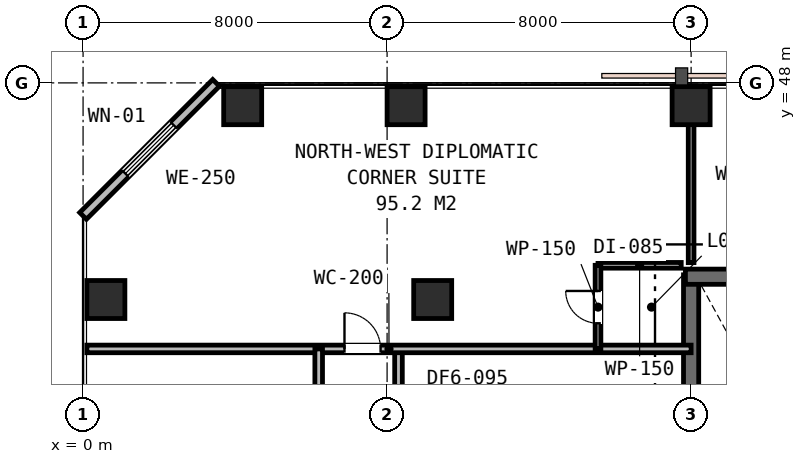
"""IFC4 building model, lengths in metres.
Left out: names, types, materials, properties, quantities, classifications, styles, units other than length and angle.
Written with IfcOpenShell. Run it as: python <this file> out.ifc"""

import sys

from ifc_helpers import new_model, si_unit, direction, frame, frame_2d, origin, origin_2d, place, context, subcontext, project, spatial, rectangle, extrude, element, fill, save


model = new_model("IFC4")
c1 = context("Model", 3, precision=1e-05, world=origin(), true_north=direction((0.0, 1.0)))
c2 = subcontext(c1, "Body", "Model", "MODEL_VIEW")
j1 = project(units=[si_unit("LENGTHUNIT", "METRE"), si_unit("PLANEANGLEUNIT", "RADIAN")], contexts=[c1])
p1 = place(None, origin())
s1 = spatial("IfcSite", under=j1, at=p1, CompositionType="ELEMENT")
p2 = place(p1, origin())
s2 = spatial("IfcBuilding", under=s1, at=p2, CompositionType="ELEMENT")
p3 = place(p2, frame((0.0, 0.0, 25.8)))
s3 = spatial("IfcBuildingStorey", under=s2, at=p3, CompositionType="ELEMENT", Elevation=25.8)
p4 = place(p3, frame((16.0, 30.65, 0.0), z_axis=(0.0, 0.0, 1.0), x_axis=(0.0, 1.0, 0.0)))
e1 = element("IfcWall", 1, at=p4, inside=s3, PredefinedType="SHEAR", context=c2, shape_type="SweptSolid", body=[
    extrude(rectangle(XDim=12.3, YDim=0.4, at=frame_2d((6.15, 0.0))), origin(), (0.0, 0.0, 1.0), 3.6),
])
p5 = place(p3, frame((15.85, 42.9, 0.0), z_axis=(0.0, 0.0, 1.0), x_axis=(1.0, 0.0, 0.0)))
e2 = element("IfcWall", 2, at=p5, inside=s3, PredefinedType="SHEAR", context=c2, shape_type="SweptSolid", body=[
    extrude(rectangle(XDim=24.3, YDim=0.4, at=frame_2d((12.15, 0.0))), origin(), (0.0, 0.0, 1.0), 3.6),
])
for number, where, z_axis, x_axis in (
    (3, (9.2, 42.3, 0.0), (0.0, 0.0, 1.0), (1.0, 0.0, 0.0)),
    (4, (0.6, 42.3, 0.0), (0.0, 0.0, 1.0), (1.0, 0.0, 0.0)),
    (5, (4.2, 47.4, 0.0), (0.0, 0.0, 1.0), (1.0, 0.0, 0.0)),
    (6, (8.5, 47.4, 0.0), (0.0, 0.0, 1.0), (1.0, 0.0, 0.0)),
    (7, (16.0, 47.4, 0.0), (0.0, 0.0, 1.0), (1.0, 0.0, 0.0)),
):
    element("IfcColumn", number, at=place(p3, frame(where, z_axis=z_axis, x_axis=x_axis)), inside=s3, PredefinedType="COLUMN", context=c2, shape_type="SweptSolid", body=[
        extrude(rectangle(XDim=1.0, YDim=1.0, at=origin_2d()), origin(), (0.0, 0.0, 1.0), 3.6),
    ])
p6 = place(p3, frame((3.5, 48.0, 0.0), z_axis=(0.0, 0.0, 1.0), x_axis=(-0.707106781187, -0.707106781187, 0.0)))
e8 = element("IfcWall", 8, at=p6, inside=s3, PredefinedType="STANDARD", context=c2, shape_type="SweptSolid", body=[
    extrude(rectangle(XDim=4.95, YDim=0.25, at=frame_2d((2.475, 0.0))), origin(), (0.0, 0.0, 1.0), 3.33),
])
p7 = place(p6, frame((1.575, 0.0, 0.75)))
e9 = element("IfcOpeningElement", 9, at=p7, cuts=e8, PredefinedType="OPENING", context=c2, shape_type="SweptSolid", body=[
    extrude(rectangle(XDim=1.8, YDim=1.85, at=frame_2d((0.9, 0.925))), frame((0.0, 0.135, 0.0), z_axis=(0.0, -1.0, 0.0), x_axis=(1.0, 0.0, 0.0)), (0.0, 0.0, 1.0), 0.27),
])
p8 = place(p3, frame((8.3, 30.8, 0.0), z_axis=(0.0, 0.0, 1.0), x_axis=(0.0, 1.0, 0.0)))
e10 = element("IfcWall", 10, at=p8, inside=s3, PredefinedType="PARTITIONING", context=c2, shape_type="SweptSolid", body=[
    extrude(rectangle(XDim=10.2, YDim=0.2, at=frame_2d((5.1, 0.0))), origin(), (0.0, 0.0, 1.0), 2.68),
])
p9 = place(p8, frame((1.95, 0.0, 0.0)))
e11 = element("IfcOpeningElement", 11, at=p9, cuts=e10, PredefinedType="OPENING", context=c2, shape_type="SweptSolid", body=[
    extrude(rectangle(XDim=0.9, YDim=2.15, at=frame_2d((0.45, 1.075))), frame((0.0, 0.11, 0.0), z_axis=(0.0, -1.0, 0.0), x_axis=(1.0, 0.0, 0.0)), (0.0, 0.0, 1.0), 0.22),
])
p10 = place(p8, frame((7.025, 0.0, 0.0)))
e12 = element("IfcOpeningElement", 12, at=p10, cuts=e10, PredefinedType="OPENING", context=c2, shape_type="SweptSolid", body=[
    extrude(rectangle(XDim=0.95, YDim=2.15, at=frame_2d((0.475, 1.075))), frame((0.0, 0.11, 0.0), z_axis=(0.0, -1.0, 0.0), x_axis=(1.0, 0.0, 0.0)), (0.0, 0.0, 1.0), 0.22),
])
p11 = place(p3, frame((0.1, 41.0, 0.0), z_axis=(0.0, 0.0, 1.0), x_axis=(1.0, 0.0, 0.0)))
e13 = element("IfcWall", 13, at=p11, inside=s3, PredefinedType="PARTITIONING", context=c2, shape_type="SweptSolid", body=[
    extrude(rectangle(XDim=15.9, YDim=0.2, at=frame_2d((7.95, 0.0))), origin(), (0.0, 0.0, 1.0), 2.68),
])
p12 = place(p11, frame((6.779, 0.0, 0.0)))
e14 = element("IfcOpeningElement", 14, at=p12, cuts=e13, PredefinedType="OPENING", context=c2, shape_type="SweptSolid", body=[
    extrude(rectangle(XDim=0.95, YDim=2.15, at=frame_2d((0.475, 1.075))), frame((0.0, 0.11, 0.0), z_axis=(0.0, -1.0, 0.0), x_axis=(1.0, 0.0, 0.0)), (0.0, 0.0, 1.0), 0.22),
])
p13 = place(p3, frame((13.55, 43.2, 0.0), z_axis=(0.0, 0.0, 1.0), x_axis=(1.0, 0.0, 0.0)))
e15 = element("IfcWall", 15, at=p13, inside=s3, PredefinedType="PARTITIONING", context=c2, shape_type="SweptSolid", body=[
    extrude(rectangle(XDim=2.19, YDim=0.15, at=frame_2d((1.095, 0.0))), origin(), (0.0, 0.0, 1.0), 3.33),
])
p14 = place(p3, frame((13.55, 41.0, 0.0), z_axis=(0.0, 0.0, 1.0), x_axis=(0.0, 1.0, 0.0)))
e16 = element("IfcWall", 16, at=p14, inside=s3, PredefinedType="PARTITIONING", context=c2, shape_type="SweptSolid", body=[
    extrude(rectangle(XDim=2.2, YDim=0.15, at=frame_2d((1.1, 0.0))), origin(), (0.0, 0.0, 1.0), 3.33),
])
p15 = place(p14, frame((0.675, 0.0, 0.0)))
e17 = element("IfcOpeningElement", 17, at=p15, cuts=e16, PredefinedType="OPENING", context=c2, shape_type="SweptSolid", body=[
    extrude(rectangle(XDim=0.85, YDim=2.15, at=frame_2d((0.425, 1.075))), frame((0.0, 0.085, 0.0), z_axis=(0.0, -1.0, 0.0), x_axis=(1.0, 0.0, 0.0)), (0.0, 0.0, 1.0), 0.17),
])
p16 = place(p3, frame((6.2, 28.6, 0.0), z_axis=(0.0, 0.0, 1.0), x_axis=(0.0, 1.0, 0.0)))
e18 = element("IfcWall", 18, at=p16, inside=s3, PredefinedType="PARTITIONING", context=c2, shape_type="SweptSolid", body=[
    extrude(rectangle(XDim=12.4, YDim=0.2, at=frame_2d((6.2, 0.0))), origin(), (0.0, 0.0, 1.0), 2.68),
])
p17 = place(p16, frame((3.725, 0.0, 0.0)))
e19 = element("IfcOpeningElement", 19, at=p17, cuts=e18, PredefinedType="OPENING", context=c2, shape_type="SweptSolid", body=[
    extrude(rectangle(XDim=0.95, YDim=2.15, at=frame_2d((0.475, 1.075))), frame((0.0, 0.11, 0.0), z_axis=(0.0, -1.0, 0.0), x_axis=(1.0, 0.0, 0.0)), (0.0, 0.0, 1.0), 0.22),
])
p18 = place(p16, frame((8.91, 0.0, 0.0)))
e20 = element("IfcOpeningElement", 20, at=p18, cuts=e18, PredefinedType="OPENING", context=c2, shape_type="SweptSolid", body=[
    extrude(rectangle(XDim=0.95, YDim=2.15, at=frame_2d((0.475, 1.075))), frame((0.0, 0.11, 0.0), z_axis=(0.0, -1.0, 0.0), x_axis=(1.0, 0.0, 0.0)), (0.0, 0.0, 1.0), 0.22),
])
p19 = place(p3, frame((16.0, 43.27, 0.0), z_axis=(0.0, 0.0, 1.0), x_axis=(0.0, 1.0, 0.0)))
e21 = element("IfcWall", 21, at=p19, inside=s3, PredefinedType="PARTITIONING", context=c2, shape_type="SweptSolid", body=[
    extrude(rectangle(XDim=4.63, YDim=0.15, at=frame_2d((2.315, 0.0))), origin(), (0.0, 0.0, 1.0), 2.87),
])
p20 = place(p7, origin())
e22 = element("IfcWindow", 22, at=p20, inside=s3, PartitioningType="SINGLE_PANEL", PredefinedType="WINDOW", context=c2, shape_type="SweptSolid", body=[
    extrude(rectangle(XDim=1.8, YDim=1.85, at=frame_2d((0.9, 0.925))), frame((0.0, 0.03, 0.0), z_axis=(0.0, -1.0, 0.0), x_axis=(1.0, 0.0, 0.0)), (0.0, 0.0, 1.0), 0.06),
])
fill(e9, e22)
p21 = place(p12, origin())
e23 = element("IfcDoor", 23, at=p21, inside=s3, OperationType="SINGLE_SWING_LEFT", PredefinedType="DOOR", context=c2, shape_type="SweptSolid", body=[
    extrude(rectangle(XDim=0.95, YDim=2.15, at=frame_2d((0.475, 1.075))), frame((0.0, 0.025, 0.0), z_axis=(0.0, -1.0, 0.0), x_axis=(1.0, 0.0, 0.0)), (0.0, 0.0, 1.0), 0.05),
])
fill(e14, e23)
p22 = place(p15, origin())
e24 = element("IfcDoor", 24, at=p22, inside=s3, OperationType="SINGLE_SWING_RIGHT", PredefinedType="DOOR", context=c2, shape_type="SweptSolid", body=[
    extrude(rectangle(XDim=0.85, YDim=2.15, at=frame_2d((0.425, 1.075))), frame((0.0, 0.025, 0.0), z_axis=(0.0, -1.0, 0.0), x_axis=(1.0, 0.0, 0.0)), (0.0, 0.0, 1.0), 0.05),
])
fill(e17, e24)
save(model, sys.argv[1])
